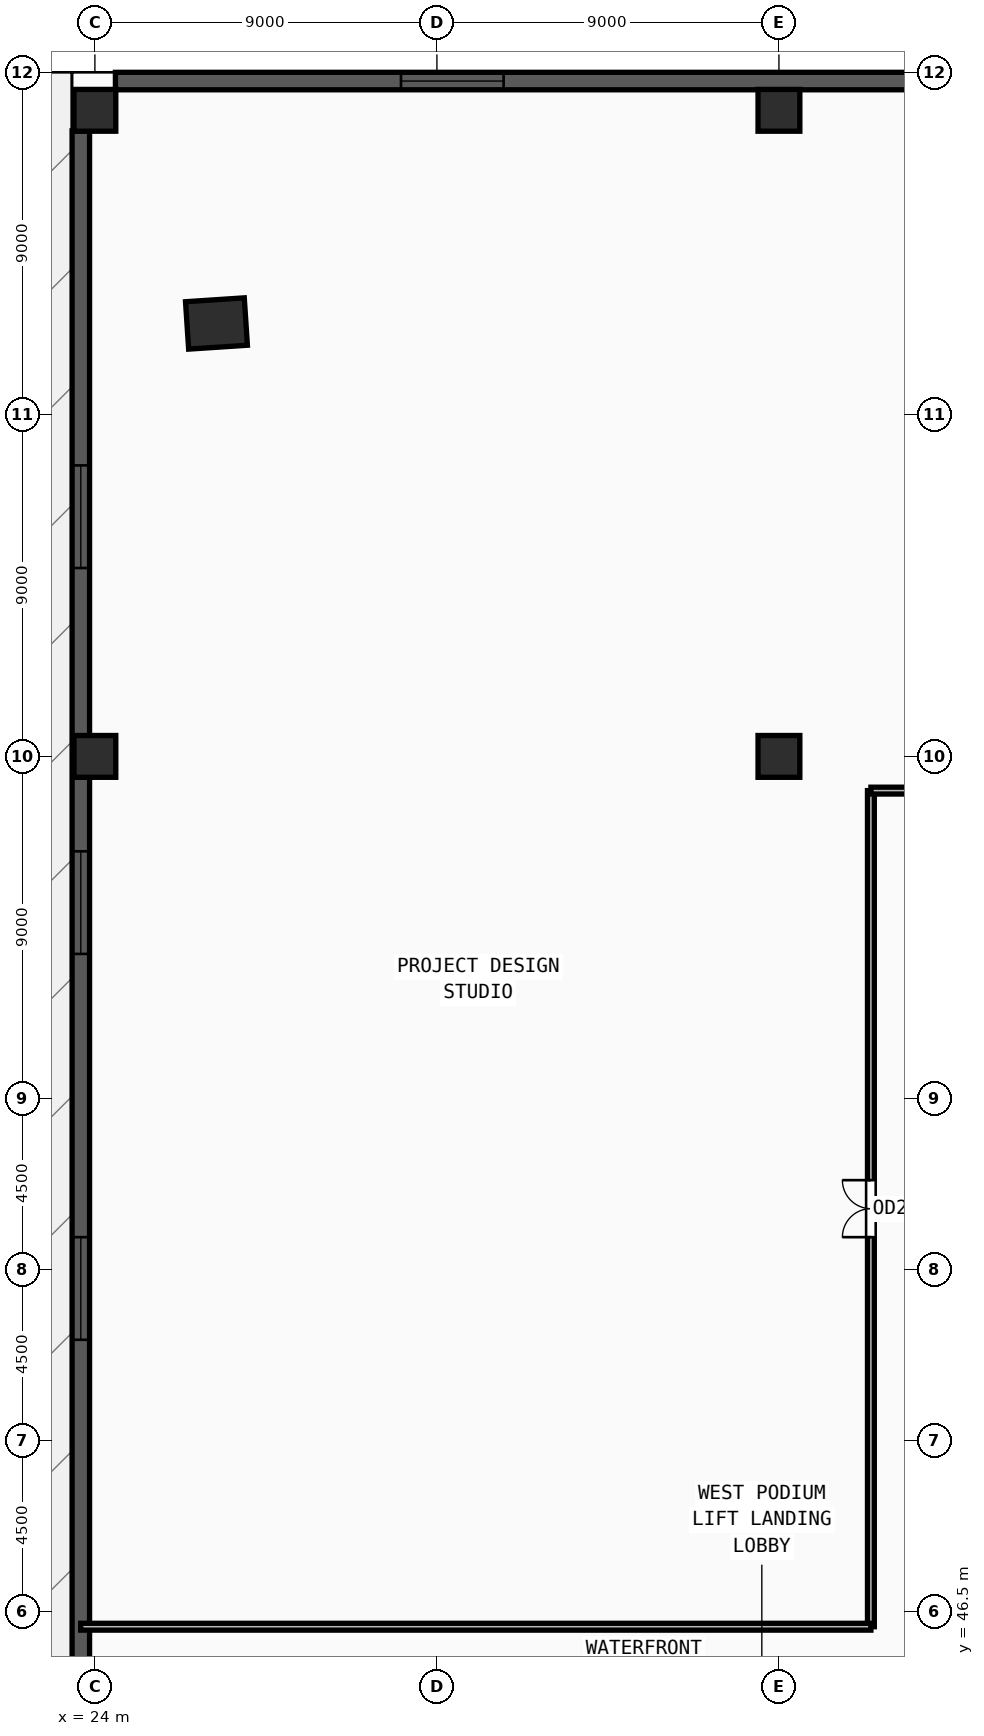
"""IFC4 building model, lengths in metres.
Left out: names, types, materials, properties, quantities, classifications, styles, units other than length and angle.
Written with IfcOpenShell. Run it as: python <this file> out.ifc"""

import sys

from ifc_helpers import new_model, si_unit, direction, frame, frame_2d, origin, origin_2d, place, context, subcontext, project, spatial, rectangle, extrude, source, transform, mapped, element, fill, save


model = new_model("IFC4")
c1 = context("Model", 3, precision=1e-05, world=origin(), true_north=direction((0.0, 1.0)))
c2 = subcontext(c1, "Body", "Model", "MODEL_VIEW")
j1 = project(units=[si_unit("LENGTHUNIT", "METRE"), si_unit("PLANEANGLEUNIT", "RADIAN")], contexts=[c1])
p1 = place(None, origin())
s1 = spatial("IfcSite", under=j1, at=p1, CompositionType="ELEMENT")
p2 = place(p1, origin())
s2 = spatial("IfcBuilding", under=s1, at=p2, CompositionType="ELEMENT")
p3 = place(p2, frame((0.0, 0.0, 18.9)))
s3 = spatial("IfcBuildingStorey", under=s2, at=p3, CompositionType="ELEMENT", Elevation=18.9)
m1 = source(origin(), c2, "Body", "SweptSolid", [
    extrude(rectangle(XDim=1.55, YDim=1.25, at=origin_2d()), origin(), (0.0, 0.0, 1.0), 4.5),
])
p4 = place(p3, frame((27.199, 80.391, 0.0), z_axis=(0.0, 0.0, 1.0), x_axis=(0.997824541457, 0.065925597951, 0.0)))
e1 = element("IfcColumn", 1, at=p4, inside=s3, PredefinedType="COLUMN", context=c2, shape_type="MappedRepresentation", body=[
    mapped(m1, transform((0.0, 0.0, 0.0), x_axis=(1.0, 0.0, 0.0), y_axis=(0.0, 1.0, 0.0), z_axis=(0.0, 0.0, 1.0), scale=1.0)),
])
m2 = source(origin(), c2, "Body", "SweptSolid", [
    extrude(rectangle(XDim=1.1, YDim=1.1, at=origin_2d()), origin(), (0.0, 0.0, 1.0), 4.5),
])
for number, where, z_axis, x_axis in (
    (2, (24.0, 69.0, 0.0), (0.0, 0.0, 1.0), (1.0, 0.0, 0.0)),
    (3, (42.0, 69.0, 0.0), (0.0, 0.0, 1.0), (1.0, 0.0, 0.0)),
    (4, (24.0, 86.0, 0.0), (0.0, 0.0, 1.0), (1.0, 0.0, 0.0)),
    (5, (42.0, 86.0, 0.0), (0.0, 0.0, 1.0), (1.0, 0.0, 0.0)),
):
    element("IfcColumn", number, at=place(p3, frame(where, z_axis=z_axis, x_axis=x_axis)), inside=s3, PredefinedType="COLUMN", context=c2, shape_type="MappedRepresentation", body=[
        mapped(m2, transform((0.0, 0.0, 0.0), x_axis=(1.0, 0.0, 0.0), y_axis=(0.0, 1.0, 0.0), z_axis=(0.0, 0.0, 1.0), scale=1.0)),
    ])
p5 = place(p3, frame((95.46, 86.77, 0.0), z_axis=(0.0, 0.0, 1.0), x_axis=(-1.0, 0.0, 0.0)))
e6 = element("IfcWall", 6, at=p5, inside=s3, PredefinedType="SOLIDWALL", context=c2, shape_type="SweptSolid", body=[
    extrude(rectangle(XDim=70.92, YDim=0.46, at=frame_2d((35.46, 0.0))), origin(), (0.0, 0.0, 1.0), 3.6),
])
m3 = source(origin(), c2, "Body", "SweptSolid", [
    extrude(rectangle(XDim=2.7, YDim=2.35, at=frame_2d((1.35, 1.175))), frame((0.0, 0.24, 0.0), z_axis=(0.0, -1.0, 0.0), x_axis=(1.0, 0.0, 0.0)), (0.0, 0.0, 1.0), 0.48),
])
p6 = place(p5, frame((7.515, 0.0, 0.55)))
e7 = element("IfcOpeningElement", 7, at=p6, cuts=e6, PredefinedType="OPENING", context=c2, shape_type="MappedRepresentation", body=[
    mapped(m3, transform((0.0, 0.0, 0.0), x_axis=(1.0, 0.0, 0.0), y_axis=(0.0, 1.0, 0.0), z_axis=(0.0, 0.0, 1.0), scale=1.0)),
])
p7 = place(p5, frame((25.245, 0.0, 0.55)))
e8 = element("IfcOpeningElement", 8, at=p7, cuts=e6, PredefinedType="OPENING", context=c2, shape_type="MappedRepresentation", body=[
    mapped(m3, transform((0.0, 0.0, 0.0), x_axis=(1.0, 0.0, 0.0), y_axis=(0.0, 1.0, 0.0), z_axis=(0.0, 0.0, 1.0), scale=1.0)),
])
p8 = place(p5, frame((34.11, 0.0, 0.55)))
e9 = element("IfcOpeningElement", 9, at=p8, cuts=e6, PredefinedType="OPENING", context=c2, shape_type="MappedRepresentation", body=[
    mapped(m3, transform((0.0, 0.0, 0.0), x_axis=(1.0, 0.0, 0.0), y_axis=(0.0, 1.0, 0.0), z_axis=(0.0, 0.0, 1.0), scale=1.0)),
])
p9 = place(p5, frame((42.975, 0.0, 0.55)))
e10 = element("IfcOpeningElement", 10, at=p9, cuts=e6, PredefinedType="OPENING", context=c2, shape_type="MappedRepresentation", body=[
    mapped(m3, transform((0.0, 0.0, 0.0), x_axis=(1.0, 0.0, 0.0), y_axis=(0.0, 1.0, 0.0), z_axis=(0.0, 0.0, 1.0), scale=1.0)),
])
p10 = place(p5, frame((60.705, 0.0, 0.55)))
e11 = element("IfcOpeningElement", 11, at=p10, cuts=e6, PredefinedType="OPENING", context=c2, shape_type="MappedRepresentation", body=[
    mapped(m3, transform((0.0, 0.0, 0.0), x_axis=(1.0, 0.0, 0.0), y_axis=(0.0, 1.0, 0.0), z_axis=(0.0, 0.0, 1.0), scale=1.0)),
])
p11 = place(p3, frame((23.63, 85.46, 0.0), z_axis=(0.0, 0.0, 1.0), x_axis=(0.0, -1.0, 0.0)))
e12 = element("IfcWall", 12, at=p11, inside=s3, PredefinedType="SOLIDWALL", context=c2, shape_type="SweptSolid", body=[
    extrude(rectangle(XDim=60.92, YDim=0.46, at=frame_2d((30.46, 0.0))), origin(), (0.0, 0.0, 1.0), 3.6),
])
p12 = place(p11, frame((8.803, 0.0, 0.55)))
e13 = element("IfcOpeningElement", 13, at=p12, cuts=e12, PredefinedType="OPENING", context=c2, shape_type="MappedRepresentation", body=[
    mapped(m3, transform((0.0, 0.0, 0.0), x_axis=(1.0, 0.0, 0.0), y_axis=(0.0, 1.0, 0.0), z_axis=(0.0, 0.0, 1.0), scale=1.0)),
])
p13 = place(p11, frame((18.957, 0.0, 0.55)))
e14 = element("IfcOpeningElement", 14, at=p13, cuts=e12, PredefinedType="OPENING", context=c2, shape_type="MappedRepresentation", body=[
    mapped(m3, transform((0.0, 0.0, 0.0), x_axis=(1.0, 0.0, 0.0), y_axis=(0.0, 1.0, 0.0), z_axis=(0.0, 0.0, 1.0), scale=1.0)),
])
p14 = place(p11, frame((29.11, 0.0, 0.55)))
e15 = element("IfcOpeningElement", 15, at=p14, cuts=e12, PredefinedType="OPENING", context=c2, shape_type="MappedRepresentation", body=[
    mapped(m3, transform((0.0, 0.0, 0.0), x_axis=(1.0, 0.0, 0.0), y_axis=(0.0, 1.0, 0.0), z_axis=(0.0, 0.0, 1.0), scale=1.0)),
])
p15 = place(p11, frame((49.417, 0.0, 0.55)))
e16 = element("IfcOpeningElement", 16, at=p15, cuts=e12, PredefinedType="OPENING", context=c2, shape_type="MappedRepresentation", body=[
    mapped(m3, transform((0.0, 0.0, 0.0), x_axis=(1.0, 0.0, 0.0), y_axis=(0.0, 1.0, 0.0), z_axis=(0.0, 0.0, 1.0), scale=1.0)),
])
p16 = place(p3, frame((44.42, 46.1, 0.0), z_axis=(0.0, 0.0, 1.0), x_axis=(0.0, 1.0, 0.0)))
e17 = element("IfcWall", 17, at=p16, inside=s3, PredefinedType="PARTITIONING", context=c2, shape_type="SweptSolid", body=[
    extrude(rectangle(XDim=22.0, YDim=0.18, at=frame_2d((11.0, 0.0))), origin(), (0.0, 0.0, 1.0), 3.6),
])
m4 = source(origin(), c2, "Body", "SweptSolid", [
    extrude(rectangle(XDim=1.5, YDim=2.2, at=frame_2d((0.75, 1.1))), frame((0.0, 0.1, 0.0), z_axis=(0.0, -1.0, 0.0), x_axis=(1.0, 0.0, 0.0)), (0.0, 0.0, 1.0), 0.2),
])
p17 = place(p16, frame((10.25, 0.0, 0.0)))
e18 = element("IfcOpeningElement", 18, at=p17, cuts=e17, PredefinedType="OPENING", context=c2, shape_type="MappedRepresentation", body=[
    mapped(m4, transform((0.0, 0.0, 0.0), x_axis=(1.0, 0.0, 0.0), y_axis=(0.0, 1.0, 0.0), z_axis=(0.0, 0.0, 1.0), scale=1.0)),
])
p18 = place(p3, frame((23.625, 46.1, 0.0), z_axis=(0.0, 0.0, 1.0), x_axis=(1.0, 0.0, 0.0)))
e19 = element("IfcWall", 19, at=p18, inside=s3, PredefinedType="PARTITIONING", context=c2, shape_type="SweptSolid", body=[
    extrude(rectangle(XDim=20.795, YDim=0.18, at=frame_2d((10.397, 0.0))), origin(), (0.0, 0.0, 1.0), 3.6),
])
p19 = place(p3, frame((44.42, 68.1, 0.0), z_axis=(0.0, 0.0, 1.0), x_axis=(1.0, 0.0, 0.0)))
e20 = element("IfcWall", 20, at=p19, inside=s3, PredefinedType="PARTITIONING", context=c2, shape_type="SweptSolid", body=[
    extrude(rectangle(XDim=3.88, YDim=0.18, at=frame_2d((1.94, 0.0))), origin(), (0.0, 0.0, 1.0), 3.6),
])
m5 = source(origin(), c2, "Body", "SweptSolid", [
    extrude(rectangle(XDim=2.7, YDim=2.35, at=frame_2d((1.35, 1.175))), frame((0.0, 0.03, 0.0), z_axis=(0.0, -1.0, 0.0), x_axis=(1.0, 0.0, 0.0)), (0.0, 0.0, 1.0), 0.06),
])
p20 = place(p10, origin())
e21 = element("IfcWindow", 21, at=p20, inside=s3, PartitioningType="TRIPLE_PANEL_VERTICAL", PredefinedType="WINDOW", context=c2, shape_type="MappedRepresentation", body=[
    mapped(m5, transform((0.0, 0.0, 0.0), x_axis=(1.0, 0.0, 0.0), y_axis=(0.0, 1.0, 0.0), z_axis=(0.0, 0.0, 1.0), scale=1.0)),
])
fill(e11, e21)
p21 = place(p12, origin())
e22 = element("IfcWindow", 22, at=p21, inside=s3, PartitioningType="TRIPLE_PANEL_VERTICAL", PredefinedType="WINDOW", context=c2, shape_type="MappedRepresentation", body=[
    mapped(m5, transform((0.0, 0.0, 0.0), x_axis=(1.0, 0.0, 0.0), y_axis=(0.0, 1.0, 0.0), z_axis=(0.0, 0.0, 1.0), scale=1.0)),
])
fill(e13, e22)
p22 = place(p13, origin())
e23 = element("IfcWindow", 23, at=p22, inside=s3, PartitioningType="TRIPLE_PANEL_VERTICAL", PredefinedType="WINDOW", context=c2, shape_type="MappedRepresentation", body=[
    mapped(m5, transform((0.0, 0.0, 0.0), x_axis=(1.0, 0.0, 0.0), y_axis=(0.0, 1.0, 0.0), z_axis=(0.0, 0.0, 1.0), scale=1.0)),
])
fill(e14, e23)
p23 = place(p14, origin())
e24 = element("IfcWindow", 24, at=p23, inside=s3, PartitioningType="TRIPLE_PANEL_VERTICAL", PredefinedType="WINDOW", context=c2, shape_type="MappedRepresentation", body=[
    mapped(m5, transform((0.0, 0.0, 0.0), x_axis=(1.0, 0.0, 0.0), y_axis=(0.0, 1.0, 0.0), z_axis=(0.0, 0.0, 1.0), scale=1.0)),
])
fill(e15, e24)
m6 = source(origin(), c2, "Body", "SweptSolid", [
    extrude(rectangle(XDim=1.5, YDim=2.2, at=frame_2d((0.75, 1.1))), frame((0.0, 0.025, 0.0), z_axis=(0.0, -1.0, 0.0), x_axis=(1.0, 0.0, 0.0)), (0.0, 0.0, 1.0), 0.05),
])
p24 = place(p17, origin())
e25 = element("IfcDoor", 25, at=p24, inside=s3, OperationType="DOUBLE_DOOR_SINGLE_SWING", PredefinedType="DOOR", context=c2, shape_type="MappedRepresentation", body=[
    mapped(m6, transform((0.0, 0.0, 0.0), x_axis=(1.0, 0.0, 0.0), y_axis=(0.0, 1.0, 0.0), z_axis=(0.0, 0.0, 1.0), scale=1.0)),
])
fill(e18, e25)
save(model, sys.argv[1])
